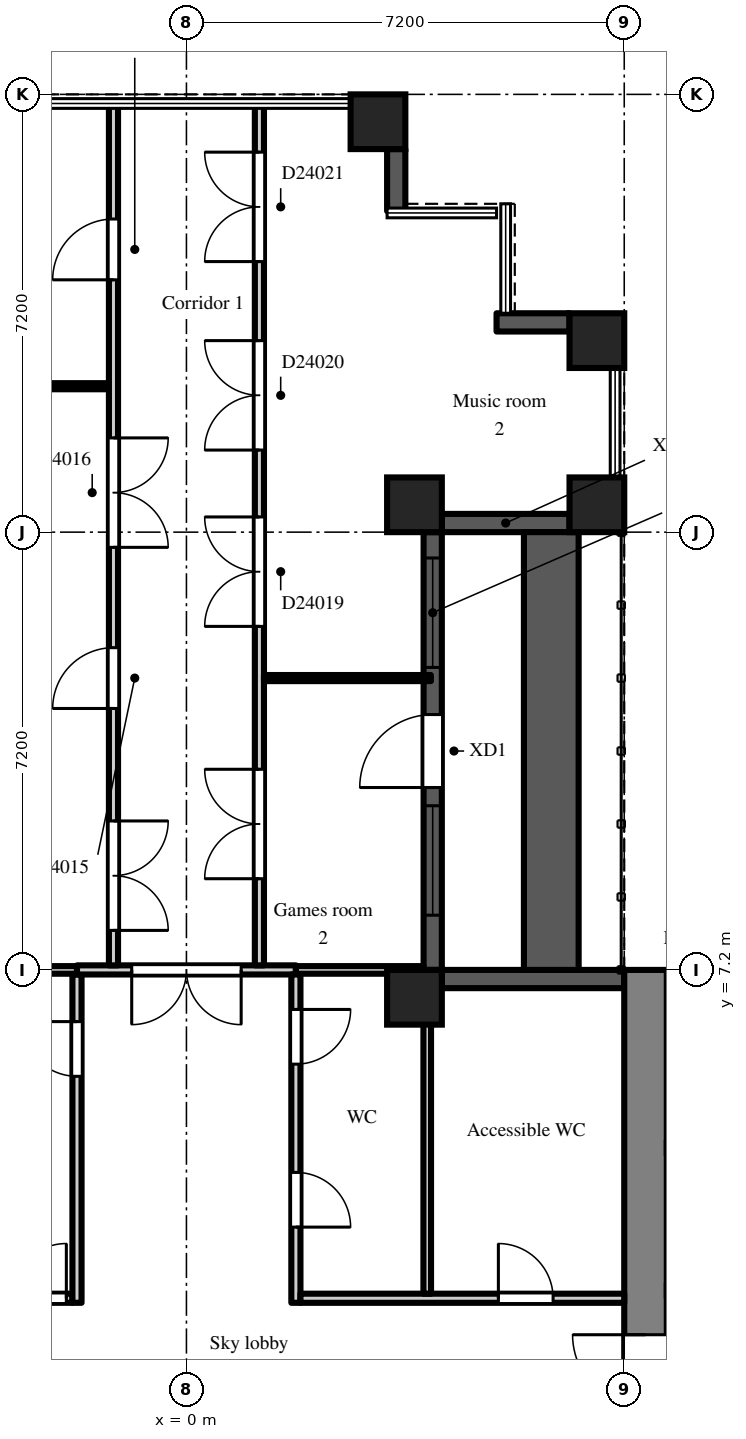
"""IFC4 building model, lengths in metres.
Left out: names, types, materials, properties, quantities, classifications, styles, units other than length and angle.
Written with IfcOpenShell. Run it as: python <this file> out.ifc"""

import sys

from ifc_helpers import new_model, si_unit, direction, frame, frame_2d, origin, origin_2d, place, context, subcontext, project, spatial, rectangle, extrude, element, fill, save


model = new_model("IFC4")
c1 = context("Model", 3, precision=1e-05, world=origin(), true_north=direction((0.0, 1.0)))
c2 = subcontext(c1, "Body", "Model", "MODEL_VIEW")
j1 = project(units=[si_unit("LENGTHUNIT", "METRE"), si_unit("PLANEANGLEUNIT", "RADIAN")], contexts=[c1])
p1 = place(None, origin())
s1 = spatial("IfcSite", under=j1, at=p1, CompositionType="ELEMENT")
p2 = place(p1, origin())
s2 = spatial("IfcBuilding", under=s1, at=p2, CompositionType="ELEMENT")
p3 = place(p2, frame((0.0, 0.0, 166.5)))
s3 = spatial("IfcBuildingStorey", under=s2, at=p3, CompositionType="ELEMENT", Elevation=166.5)
for number, where, z_axis, x_axis in (
    (1, (3.15, 21.15, 0.0), (0.0, 0.0, 1.0), (1.0, 0.0, 0.0)),
    (2, (3.75, 6.75, 0.0), (0.0, 0.0, 1.0), (1.0, 0.0, 0.0)),
    (3, (3.75, 14.85, 0.0), (0.0, 0.0, 1.0), (1.0, 0.0, 0.0)),
    (4, (6.75, 14.85, 0.0), (0.0, 0.0, 1.0), (1.0, 0.0, 0.0)),
    (5, (6.75, 17.55, 0.0), (0.0, 0.0, 1.0), (1.0, 0.0, 0.0)),
):
    element("IfcColumn", number, at=place(p3, frame(where, z_axis=z_axis, x_axis=x_axis)), inside=s3, PredefinedType="COLUMN", context=c2, shape_type="SweptSolid", body=[
        extrude(rectangle(XDim=0.9, YDim=0.9, at=origin_2d()), origin(), (0.0, 0.0, 1.0), 4.2),
    ])
p4 = place(p3, frame((7.2, 7.05, 0.0), z_axis=(0.0, 0.0, 1.0), x_axis=(-1.0, 0.0, 0.0)))
e6 = element("IfcWall", 6, at=p4, inside=s3, PredefinedType="SOLIDWALL", context=c2, shape_type="SweptSolid", body=[
    extrude(rectangle(XDim=3.0, YDim=0.3, at=frame_2d((1.5, 0.0))), origin(), (0.0, 0.0, 1.0), 3.4),
])
p5 = place(p3, frame((4.05, 7.2, 0.0), z_axis=(0.0, 0.0, 1.0), x_axis=(0.0, 1.0, 0.0)))
e7 = element("IfcWall", 7, at=p5, inside=s3, PredefinedType="SOLIDWALL", context=c2, shape_type="SweptSolid", body=[
    extrude(rectangle(XDim=7.2, YDim=0.3, at=frame_2d((3.6, 0.0))), origin(), (0.0, 0.0, 1.0), 3.4),
])
p6 = place(p5, frame((3.0, 0.0, 0.0)))
e8 = element("IfcOpeningElement", 8, at=p6, cuts=e7, PredefinedType="OPENING", context=c2, shape_type="SweptSolid", body=[
    extrude(rectangle(XDim=1.2, YDim=2.05, at=frame_2d((0.6, 1.025))), frame((0.0, 0.16, 0.0), z_axis=(0.0, -1.0, 0.0), x_axis=(1.0, 0.0, 0.0)), (0.0, 0.0, 1.0), 0.32),
])
p7 = place(p5, frame((0.9, 0.0, 0.2)))
e9 = element("IfcOpeningElement", 9, at=p7, cuts=e7, PredefinedType="OPENING", context=c2, shape_type="SweptSolid", body=[
    extrude(rectangle(XDim=1.8, YDim=1.85, at=frame_2d((0.9, 0.925))), frame((0.0, 0.16, 0.0), z_axis=(0.0, -1.0, 0.0), x_axis=(1.0, 0.0, 0.0)), (0.0, 0.0, 1.0), 0.32),
])
p8 = place(p5, frame((4.975, 0.0, 0.2)))
e10 = element("IfcOpeningElement", 10, at=p8, cuts=e7, PredefinedType="OPENING", context=c2, shape_type="SweptSolid", body=[
    extrude(rectangle(XDim=1.8, YDim=1.85, at=frame_2d((0.9, 0.925))), frame((0.0, 0.16, 0.0), z_axis=(0.0, -1.0, 0.0), x_axis=(1.0, 0.0, 0.0)), (0.0, 0.0, 1.0), 0.32),
])
p9 = place(p3, frame((4.2, 14.55, 0.0), z_axis=(0.0, 0.0, 1.0), x_axis=(1.0, 0.0, 0.0)))
e11 = element("IfcWall", 11, at=p9, inside=s3, PredefinedType="SOLIDWALL", context=c2, shape_type="SweptSolid", body=[
    extrude(rectangle(XDim=2.1, YDim=0.3, at=frame_2d((1.05, 0.0))), origin(), (0.0, 0.0, 1.0), 3.4),
])
p10 = place(p3, frame((6.3, 17.85, 0.0), z_axis=(0.0, 0.0, 1.0), x_axis=(-1.0, 0.0, 0.0)))
e12 = element("IfcWall", 12, at=p10, inside=s3, PredefinedType="SOLIDWALL", context=c2, shape_type="SweptSolid", body=[
    extrude(rectangle(XDim=1.2, YDim=0.3, at=frame_2d((0.6, 0.0))), origin(), (0.0, 0.0, 1.0), 3.8),
])
p11 = place(p3, frame((3.45, 19.68, 0.0), z_axis=(0.0, 0.0, 1.0), x_axis=(0.0, 1.0, 0.0)))
e13 = element("IfcWall", 13, at=p11, inside=s3, PredefinedType="SOLIDWALL", context=c2, shape_type="SweptSolid", body=[
    extrude(rectangle(XDim=1.02, YDim=0.3, at=frame_2d((0.51, 0.0))), origin(), (0.0, 0.0, 1.0), 3.8),
])
p12 = place(p3, frame((6.0, 7.2, 0.0), z_axis=(0.0, 0.0, 1.0), x_axis=(0.0, 1.0, 0.0)))
e14 = element("IfcWall", 14, at=p12, inside=s3, PredefinedType="PARAPET", context=c2, shape_type="SweptSolid", body=[
    extrude(rectangle(XDim=7.2, YDim=0.9, at=frame_2d((3.6, 0.0))), origin(), (0.0, 0.0, 1.0), 0.8),
])
p13 = place(p3, frame((7.55, -7.2, 0.0), z_axis=(0.0, 0.0, 1.0), x_axis=(0.0, 1.0, 0.0)))
e15 = element("IfcWall", 15, at=p13, inside=s3, PredefinedType="SHEAR", context=c2, shape_type="SweptSolid", body=[
    extrude(rectangle(XDim=14.4, YDim=0.7, at=frame_2d((7.2, 0.0))), origin(), (0.0, 0.0, 1.0), 3.8),
])
p14 = place(p13, frame((6.0, 0.0, 0.0)))
e16 = element("IfcOpeningElement", 16, at=p14, cuts=e15, PredefinedType="OPENING", context=c2, shape_type="SweptSolid", body=[
    extrude(rectangle(XDim=2.4, YDim=2.2, at=frame_2d((1.2, 1.1))), frame((0.0, 0.36, 0.0), z_axis=(0.0, -1.0, 0.0), x_axis=(1.0, 0.0, 0.0)), (0.0, 0.0, 1.0), 0.72),
])
p15 = place(p3, frame((-7.2, 1.8, 0.0), z_axis=(0.0, 0.0, 1.0), x_axis=(1.0, 0.0, 0.0)))
e17 = element("IfcWall", 17, at=p15, inside=s3, PredefinedType="PARTITIONING", context=c2, shape_type="SweptSolid", body=[
    extrude(rectangle(XDim=5.325, YDim=0.15, at=frame_2d((2.663, 0.0))), origin(), (0.0, 0.0, 1.0), 3.8),
])
p16 = place(p15, frame((0.65, 0.0, 0.0)))
e18 = element("IfcOpeningElement", 18, at=p16, cuts=e17, PredefinedType="OPENING", context=c2, shape_type="SweptSolid", body=[
    extrude(rectangle(XDim=0.9, YDim=2.1, at=frame_2d((0.45, 1.05))), frame((0.0, 0.085, 0.0), z_axis=(0.0, -1.0, 0.0), x_axis=(1.0, 0.0, 0.0)), (0.0, 0.0, 1.0), 0.17),
])
p17 = place(p15, frame((4.325, 0.0, 0.0)))
e19 = element("IfcOpeningElement", 19, at=p17, cuts=e17, PredefinedType="OPENING", context=c2, shape_type="SweptSolid", body=[
    extrude(rectangle(XDim=0.9, YDim=2.1, at=frame_2d((0.45, 1.05))), frame((0.0, 0.085, 0.0), z_axis=(0.0, -1.0, 0.0), x_axis=(1.0, 0.0, 0.0)), (0.0, 0.0, 1.0), 0.17),
])
p18 = place(p3, frame((-7.02, 16.8, 0.0), z_axis=(0.0, 0.0, 1.0), x_axis=(1.0, 0.0, 0.0)))
e20 = element("IfcWall", 20, at=p18, inside=s3, PredefinedType="PARTITIONING", context=c2, shape_type="SweptSolid", body=[
    extrude(rectangle(XDim=5.745, YDim=0.1, at=frame_2d((2.873, 0.0))), origin(), (0.0, 0.0, 1.0), 3.8),
])
p19 = place(p3, frame((-3.9, 7.2, 0.0), z_axis=(0.0, 0.0, 1.0), x_axis=(1.0, 0.0, 0.0)))
e21 = element("IfcWall", 21, at=p19, inside=s3, PredefinedType="PARTITIONING", context=c2, shape_type="SweptSolid", body=[
    extrude(rectangle(XDim=2.1, YDim=0.125, at=frame_2d((1.05, 0.0))), origin(), (0.0, 0.0, 1.0), 3.8),
])
p20 = place(p3, frame((-1.8, 1.725, 0.0), z_axis=(0.0, 0.0, 1.0), x_axis=(0.0, 1.0, 0.0)))
e22 = element("IfcWall", 22, at=p20, inside=s3, PredefinedType="PARTITIONING", context=c2, shape_type="SweptSolid", body=[
    extrude(rectangle(XDim=5.4, YDim=0.15, at=frame_2d((2.7, 0.0))), origin(), (0.0, 0.0, 1.0), 3.8),
])
p21 = place(p20, frame((3.725, 0.0, 0.0)))
e23 = element("IfcOpeningElement", 23, at=p21, cuts=e22, PredefinedType="OPENING", context=c2, shape_type="SweptSolid", body=[
    extrude(rectangle(XDim=0.9, YDim=2.1, at=frame_2d((0.45, 1.05))), frame((0.0, 0.085, 0.0), z_axis=(0.0, -1.0, 0.0), x_axis=(1.0, 0.0, 0.0)), (0.0, 0.0, 1.0), 0.17),
])
p22 = place(p3, frame((-1.8, 7.2, 0.0), z_axis=(0.0, 0.0, 1.0), x_axis=(1.0, 0.0, 0.0)))
e24 = element("IfcWall", 24, at=p22, inside=s3, PredefinedType="PARTITIONING", context=c2, shape_type="SweptSolid", body=[
    extrude(rectangle(XDim=3.6, YDim=0.15, at=frame_2d((1.8, 0.0))), origin(), (0.0, 0.0, 1.0), 3.8),
])
p23 = place(p22, frame((0.9, 0.0, 0.0)))
e25 = element("IfcOpeningElement", 25, at=p23, cuts=e24, PredefinedType="OPENING", context=c2, shape_type="SweptSolid", body=[
    extrude(rectangle(XDim=1.8, YDim=2.1, at=frame_2d((0.9, 1.05))), frame((0.0, 0.085, 0.0), z_axis=(0.0, -1.0, 0.0), x_axis=(1.0, 0.0, 0.0)), (0.0, 0.0, 1.0), 0.17),
])
p24 = place(p3, frame((-1.2, 7.275, 0.0), z_axis=(0.0, 0.0, 1.0), x_axis=(0.0, 1.0, 0.0)))
e26 = element("IfcWall", 26, at=p24, inside=s3, PredefinedType="PARTITIONING", context=c2, shape_type="SweptSolid", body=[
    extrude(rectangle(XDim=14.145, YDim=0.15, at=frame_2d((7.073, 0.0))), origin(), (0.0, 0.0, 1.0), 3.8),
])
p25 = place(p24, frame((0.575, 0.0, 0.0)))
e27 = element("IfcOpeningElement", 27, at=p25, cuts=e26, PredefinedType="OPENING", context=c2, shape_type="SweptSolid", body=[
    extrude(rectangle(XDim=1.8, YDim=2.1, at=frame_2d((0.9, 1.05))), frame((0.0, 0.085, 0.0), z_axis=(0.0, -1.0, 0.0), x_axis=(1.0, 0.0, 0.0)), (0.0, 0.0, 1.0), 0.17),
])
p26 = place(p24, frame((4.225, 0.0, 0.0)))
e28 = element("IfcOpeningElement", 28, at=p26, cuts=e26, PredefinedType="OPENING", context=c2, shape_type="SweptSolid", body=[
    extrude(rectangle(XDim=1.0, YDim=2.1, at=frame_2d((0.5, 1.05))), frame((0.0, 0.085, 0.0), z_axis=(0.0, -1.0, 0.0), x_axis=(1.0, 0.0, 0.0)), (0.0, 0.0, 1.0), 0.17),
])
p27 = place(p24, frame((6.875, 0.0, 0.0)))
e29 = element("IfcOpeningElement", 29, at=p27, cuts=e26, PredefinedType="OPENING", context=c2, shape_type="SweptSolid", body=[
    extrude(rectangle(XDim=1.8, YDim=2.1, at=frame_2d((0.9, 1.05))), frame((0.0, 0.085, 0.0), z_axis=(0.0, -1.0, 0.0), x_axis=(1.0, 0.0, 0.0)), (0.0, 0.0, 1.0), 0.17),
])
p28 = place(p24, frame((11.275, 0.0, 0.0)))
e30 = element("IfcOpeningElement", 30, at=p28, cuts=e26, PredefinedType="OPENING", context=c2, shape_type="SweptSolid", body=[
    extrude(rectangle(XDim=1.0, YDim=2.1, at=frame_2d((0.5, 1.05))), frame((0.0, 0.085, 0.0), z_axis=(0.0, -1.0, 0.0), x_axis=(1.0, 0.0, 0.0)), (0.0, 0.0, 1.0), 0.17),
])
p29 = place(p3, frame((1.2, 7.275, 0.0), z_axis=(0.0, 0.0, 1.0), x_axis=(0.0, 1.0, 0.0)))
e31 = element("IfcWall", 31, at=p29, inside=s3, PredefinedType="PARTITIONING", context=c2, shape_type="SweptSolid", body=[
    extrude(rectangle(XDim=14.145, YDim=0.15, at=frame_2d((7.073, 0.0))), origin(), (0.0, 0.0, 1.0), 3.8),
])
p30 = place(p29, frame((1.425, 0.0, 0.0)))
e32 = element("IfcOpeningElement", 32, at=p30, cuts=e31, PredefinedType="OPENING", context=c2, shape_type="SweptSolid", body=[
    extrude(rectangle(XDim=1.8, YDim=2.1, at=frame_2d((0.9, 1.05))), frame((0.0, 0.085, 0.0), z_axis=(0.0, -1.0, 0.0), x_axis=(1.0, 0.0, 0.0)), (0.0, 0.0, 1.0), 0.17),
])
p31 = place(p29, frame((5.575, 0.0, 0.0)))
e33 = element("IfcOpeningElement", 33, at=p31, cuts=e31, PredefinedType="OPENING", context=c2, shape_type="SweptSolid", body=[
    extrude(rectangle(XDim=1.8, YDim=2.1, at=frame_2d((0.9, 1.05))), frame((0.0, 0.085, 0.0), z_axis=(0.0, -1.0, 0.0), x_axis=(1.0, 0.0, 0.0)), (0.0, 0.0, 1.0), 0.17),
])
p32 = place(p29, frame((8.475, 0.0, 0.0)))
e34 = element("IfcOpeningElement", 34, at=p32, cuts=e31, PredefinedType="OPENING", context=c2, shape_type="SweptSolid", body=[
    extrude(rectangle(XDim=1.8, YDim=2.1, at=frame_2d((0.9, 1.05))), frame((0.0, 0.085, 0.0), z_axis=(0.0, -1.0, 0.0), x_axis=(1.0, 0.0, 0.0)), (0.0, 0.0, 1.0), 0.17),
])
p33 = place(p29, frame((11.575, 0.0, 0.0)))
e35 = element("IfcOpeningElement", 35, at=p33, cuts=e31, PredefinedType="OPENING", context=c2, shape_type="SweptSolid", body=[
    extrude(rectangle(XDim=1.8, YDim=2.1, at=frame_2d((0.9, 1.05))), frame((0.0, 0.085, 0.0), z_axis=(0.0, -1.0, 0.0), x_axis=(1.0, 0.0, 0.0)), (0.0, 0.0, 1.0), 0.17),
])
p34 = place(p3, frame((1.275, 12.0, 0.0), z_axis=(0.0, 0.0, 1.0), x_axis=(1.0, 0.0, 0.0)))
e36 = element("IfcWall", 36, at=p34, inside=s3, PredefinedType="PARTITIONING", context=c2, shape_type="SweptSolid", body=[
    extrude(rectangle(XDim=2.745, YDim=0.1, at=frame_2d((1.373, 0.0))), origin(), (0.0, 0.0, 1.0), 3.8),
])
p35 = place(p3, frame((1.8, 1.725, 0.0), z_axis=(0.0, 0.0, 1.0), x_axis=(0.0, 1.0, 0.0)))
e37 = element("IfcWall", 37, at=p35, inside=s3, PredefinedType="PARTITIONING", context=c2, shape_type="SweptSolid", body=[
    extrude(rectangle(XDim=5.4, YDim=0.15, at=frame_2d((2.7, 0.0))), origin(), (0.0, 0.0, 1.0), 3.8),
])
p36 = place(p35, frame((1.245, 0.0, 0.0)))
e38 = element("IfcOpeningElement", 38, at=p36, cuts=e37, PredefinedType="OPENING", context=c2, shape_type="SweptSolid", body=[
    extrude(rectangle(XDim=0.9, YDim=2.1, at=frame_2d((0.45, 1.05))), frame((0.0, 0.085, 0.0), z_axis=(0.0, -1.0, 0.0), x_axis=(1.0, 0.0, 0.0)), (0.0, 0.0, 1.0), 0.17),
])
p37 = place(p35, frame((3.925, 0.0, 0.0)))
e39 = element("IfcOpeningElement", 39, at=p37, cuts=e37, PredefinedType="OPENING", context=c2, shape_type="SweptSolid", body=[
    extrude(rectangle(XDim=0.9, YDim=2.1, at=frame_2d((0.45, 1.05))), frame((0.0, 0.085, 0.0), z_axis=(0.0, -1.0, 0.0), x_axis=(1.0, 0.0, 0.0)), (0.0, 0.0, 1.0), 0.17),
])
p38 = place(p3, frame((1.875, 1.8, 0.0), z_axis=(0.0, 0.0, 1.0), x_axis=(1.0, 0.0, 0.0)))
e40 = element("IfcWall", 40, at=p38, inside=s3, PredefinedType="PARTITIONING", context=c2, shape_type="SweptSolid", body=[
    extrude(rectangle(XDim=5.325, YDim=0.15, at=frame_2d((2.663, 0.0))), origin(), (0.0, 0.0, 1.0), 3.8),
])
p39 = place(p38, frame((3.255, 0.0, 0.0)))
e41 = element("IfcOpeningElement", 41, at=p39, cuts=e40, PredefinedType="OPENING", context=c2, shape_type="SweptSolid", body=[
    extrude(rectangle(XDim=0.9, YDim=2.1, at=frame_2d((0.45, 1.05))), frame((0.0, 0.085, 0.0), z_axis=(0.0, -1.0, 0.0), x_axis=(1.0, 0.0, 0.0)), (0.0, 0.0, 1.0), 0.17),
])
p40 = place(p3, frame((1.8, 7.2, 0.0), z_axis=(0.0, 0.0, 1.0), x_axis=(1.0, 0.0, 0.0)))
e42 = element("IfcWall", 42, at=p40, inside=s3, PredefinedType="PARTITIONING", context=c2, shape_type="SweptSolid", body=[
    extrude(rectangle(XDim=2.1, YDim=0.125, at=frame_2d((1.05, 0.0))), origin(), (0.0, 0.0, 1.0), 3.8),
])
p41 = place(p3, frame((3.96, 1.875, 0.0), z_axis=(0.0, 0.0, 1.0), x_axis=(0.0, 1.0, 0.0)))
e43 = element("IfcWall", 43, at=p41, inside=s3, PredefinedType="PARTITIONING", context=c2, shape_type="SweptSolid", body=[
    extrude(rectangle(XDim=5.025, YDim=0.125, at=frame_2d((2.512, 0.0))), origin(), (0.0, 0.0, 1.0), 3.8),
])
p42 = place(p6, origin())
e44 = element("IfcDoor", 44, at=p42, inside=s3, OperationType="SINGLE_SWING_LEFT", PredefinedType="DOOR", context=c2, shape_type="SweptSolid", body=[
    extrude(rectangle(XDim=1.2, YDim=2.05, at=frame_2d((0.6, 1.025))), frame((0.0, 0.025, 0.0), z_axis=(0.0, -1.0, 0.0), x_axis=(1.0, 0.0, 0.0)), (0.0, 0.0, 1.0), 0.05),
])
fill(e8, e44)
p43 = place(p7, origin())
e45 = element("IfcWindow", 45, at=p43, inside=s3, PartitioningType="SINGLE_PANEL", PredefinedType="WINDOW", context=c2, shape_type="SweptSolid", body=[
    extrude(rectangle(XDim=1.8, YDim=1.85, at=frame_2d((0.9, 0.925))), frame((0.0, 0.03, 0.0), z_axis=(0.0, -1.0, 0.0), x_axis=(1.0, 0.0, 0.0)), (0.0, 0.0, 1.0), 0.06),
])
fill(e9, e45)
p44 = place(p8, origin())
e46 = element("IfcWindow", 46, at=p44, inside=s3, PartitioningType="SINGLE_PANEL", PredefinedType="WINDOW", context=c2, shape_type="SweptSolid", body=[
    extrude(rectangle(XDim=1.8, YDim=1.85, at=frame_2d((0.9, 0.925))), frame((0.0, 0.03, 0.0), z_axis=(0.0, -1.0, 0.0), x_axis=(1.0, 0.0, 0.0)), (0.0, 0.0, 1.0), 0.06),
])
fill(e10, e46)
p45 = place(p14, origin())
e47 = element("IfcDoor", 47, at=p45, inside=s3, OperationType="DOUBLE_DOOR_DOUBLE_SWING", PredefinedType="DOOR", context=c2, shape_type="SweptSolid", body=[
    extrude(rectangle(XDim=2.4, YDim=2.2, at=frame_2d((1.2, 1.1))), frame((0.0, 0.025, 0.0), z_axis=(0.0, -1.0, 0.0), x_axis=(1.0, 0.0, 0.0)), (0.0, 0.0, 1.0), 0.05),
])
fill(e16, e47)
p46 = place(p36, frame((0.9, 0.0, 0.0), z_axis=(0.0, 0.0, 1.0), x_axis=(-1.0, 0.0, 0.0)))
e48 = element("IfcDoor", 48, at=p46, inside=s3, OperationType="SINGLE_SWING_RIGHT", PredefinedType="DOOR", context=c2, shape_type="SweptSolid", body=[
    extrude(rectangle(XDim=0.9, YDim=2.1, at=frame_2d((0.45, 1.05))), frame((0.0, 0.025, 0.0), z_axis=(0.0, -1.0, 0.0), x_axis=(1.0, 0.0, 0.0)), (0.0, 0.0, 1.0), 0.05),
])
fill(e38, e48)
p47 = place(p37, frame((0.9, 0.0, 0.0), z_axis=(0.0, 0.0, 1.0), x_axis=(-1.0, 0.0, 0.0)))
e49 = element("IfcDoor", 49, at=p47, inside=s3, OperationType="SINGLE_SWING_LEFT", PredefinedType="DOOR", context=c2, shape_type="SweptSolid", body=[
    extrude(rectangle(XDim=0.9, YDim=2.1, at=frame_2d((0.45, 1.05))), frame((0.0, 0.025, 0.0), z_axis=(0.0, -1.0, 0.0), x_axis=(1.0, 0.0, 0.0)), (0.0, 0.0, 1.0), 0.05),
])
fill(e39, e49)
p48 = place(p39, origin())
e50 = element("IfcDoor", 50, at=p48, inside=s3, OperationType="SINGLE_SWING_LEFT", PredefinedType="DOOR", context=c2, shape_type="SweptSolid", body=[
    extrude(rectangle(XDim=0.9, YDim=2.1, at=frame_2d((0.45, 1.05))), frame((0.0, 0.025, 0.0), z_axis=(0.0, -1.0, 0.0), x_axis=(1.0, 0.0, 0.0)), (0.0, 0.0, 1.0), 0.05),
])
fill(e41, e50)
p49 = place(p17, origin())
e51 = element("IfcDoor", 51, at=p49, inside=s3, OperationType="SINGLE_SWING_RIGHT", PredefinedType="DOOR", context=c2, shape_type="SweptSolid", body=[
    extrude(rectangle(XDim=0.9, YDim=2.1, at=frame_2d((0.45, 1.05))), frame((0.0, 0.025, 0.0), z_axis=(0.0, -1.0, 0.0), x_axis=(1.0, 0.0, 0.0)), (0.0, 0.0, 1.0), 0.05),
])
fill(e19, e51)
p50 = place(p21, origin())
e52 = element("IfcDoor", 52, at=p50, inside=s3, OperationType="SINGLE_SWING_RIGHT", PredefinedType="DOOR", context=c2, shape_type="SweptSolid", body=[
    extrude(rectangle(XDim=0.9, YDim=2.1, at=frame_2d((0.45, 1.05))), frame((0.0, 0.025, 0.0), z_axis=(0.0, -1.0, 0.0), x_axis=(1.0, 0.0, 0.0)), (0.0, 0.0, 1.0), 0.05),
])
fill(e23, e52)
p51 = place(p23, frame((1.8, 0.0, 0.0), z_axis=(0.0, 0.0, 1.0), x_axis=(-1.0, 0.0, 0.0)))
e53 = element("IfcDoor", 53, at=p51, inside=s3, OperationType="DOUBLE_DOOR_DOUBLE_SWING", PredefinedType="DOOR", context=c2, shape_type="SweptSolid", body=[
    extrude(rectangle(XDim=1.8, YDim=2.1, at=frame_2d((0.9, 1.05))), frame((0.0, 0.025, 0.0), z_axis=(0.0, -1.0, 0.0), x_axis=(1.0, 0.0, 0.0)), (0.0, 0.0, 1.0), 0.05),
])
fill(e25, e53)
p52 = place(p25, frame((1.8, 0.0, 0.0), z_axis=(0.0, 0.0, 1.0), x_axis=(-1.0, 0.0, 0.0)))
e54 = element("IfcDoor", 54, at=p52, inside=s3, OperationType="DOUBLE_DOOR_DOUBLE_SWING", PredefinedType="DOOR", context=c2, shape_type="SweptSolid", body=[
    extrude(rectangle(XDim=1.8, YDim=2.1, at=frame_2d((0.9, 1.05))), frame((0.0, 0.025, 0.0), z_axis=(0.0, -1.0, 0.0), x_axis=(1.0, 0.0, 0.0)), (0.0, 0.0, 1.0), 0.05),
])
fill(e27, e54)
p53 = place(p26, origin())
e55 = element("IfcDoor", 55, at=p53, inside=s3, OperationType="SINGLE_SWING_LEFT", PredefinedType="DOOR", context=c2, shape_type="SweptSolid", body=[
    extrude(rectangle(XDim=1.0, YDim=2.1, at=frame_2d((0.5, 1.05))), frame((0.0, 0.025, 0.0), z_axis=(0.0, -1.0, 0.0), x_axis=(1.0, 0.0, 0.0)), (0.0, 0.0, 1.0), 0.05),
])
fill(e28, e55)
p54 = place(p27, frame((1.8, 0.0, 0.0), z_axis=(0.0, 0.0, 1.0), x_axis=(-1.0, 0.0, 0.0)))
e56 = element("IfcDoor", 56, at=p54, inside=s3, OperationType="DOUBLE_DOOR_DOUBLE_SWING", PredefinedType="DOOR", context=c2, shape_type="SweptSolid", body=[
    extrude(rectangle(XDim=1.8, YDim=2.1, at=frame_2d((0.9, 1.05))), frame((0.0, 0.025, 0.0), z_axis=(0.0, -1.0, 0.0), x_axis=(1.0, 0.0, 0.0)), (0.0, 0.0, 1.0), 0.05),
])
fill(e29, e56)
p55 = place(p28, origin())
e57 = element("IfcDoor", 57, at=p55, inside=s3, OperationType="SINGLE_SWING_LEFT", PredefinedType="DOOR", context=c2, shape_type="SweptSolid", body=[
    extrude(rectangle(XDim=1.0, YDim=2.1, at=frame_2d((0.5, 1.05))), frame((0.0, 0.025, 0.0), z_axis=(0.0, -1.0, 0.0), x_axis=(1.0, 0.0, 0.0)), (0.0, 0.0, 1.0), 0.05),
])
fill(e30, e57)
p56 = place(p30, origin())
e58 = element("IfcDoor", 58, at=p56, inside=s3, OperationType="DOUBLE_DOOR_DOUBLE_SWING", PredefinedType="DOOR", context=c2, shape_type="SweptSolid", body=[
    extrude(rectangle(XDim=1.8, YDim=2.1, at=frame_2d((0.9, 1.05))), frame((0.0, 0.025, 0.0), z_axis=(0.0, -1.0, 0.0), x_axis=(1.0, 0.0, 0.0)), (0.0, 0.0, 1.0), 0.05),
])
fill(e32, e58)
p57 = place(p31, origin())
e59 = element("IfcDoor", 59, at=p57, inside=s3, OperationType="DOUBLE_DOOR_DOUBLE_SWING", PredefinedType="DOOR", context=c2, shape_type="SweptSolid", body=[
    extrude(rectangle(XDim=1.8, YDim=2.1, at=frame_2d((0.9, 1.05))), frame((0.0, 0.025, 0.0), z_axis=(0.0, -1.0, 0.0), x_axis=(1.0, 0.0, 0.0)), (0.0, 0.0, 1.0), 0.05),
])
fill(e33, e59)
p58 = place(p32, origin())
e60 = element("IfcDoor", 60, at=p58, inside=s3, OperationType="DOUBLE_DOOR_DOUBLE_SWING", PredefinedType="DOOR", context=c2, shape_type="SweptSolid", body=[
    extrude(rectangle(XDim=1.8, YDim=2.1, at=frame_2d((0.9, 1.05))), frame((0.0, 0.025, 0.0), z_axis=(0.0, -1.0, 0.0), x_axis=(1.0, 0.0, 0.0)), (0.0, 0.0, 1.0), 0.05),
])
fill(e34, e60)
p59 = place(p33, origin())
e61 = element("IfcDoor", 61, at=p59, inside=s3, OperationType="DOUBLE_DOOR_DOUBLE_SWING", PredefinedType="DOOR", context=c2, shape_type="SweptSolid", body=[
    extrude(rectangle(XDim=1.8, YDim=2.1, at=frame_2d((0.9, 1.05))), frame((0.0, 0.025, 0.0), z_axis=(0.0, -1.0, 0.0), x_axis=(1.0, 0.0, 0.0)), (0.0, 0.0, 1.0), 0.05),
])
fill(e35, e61)
save(model, sys.argv[1])
